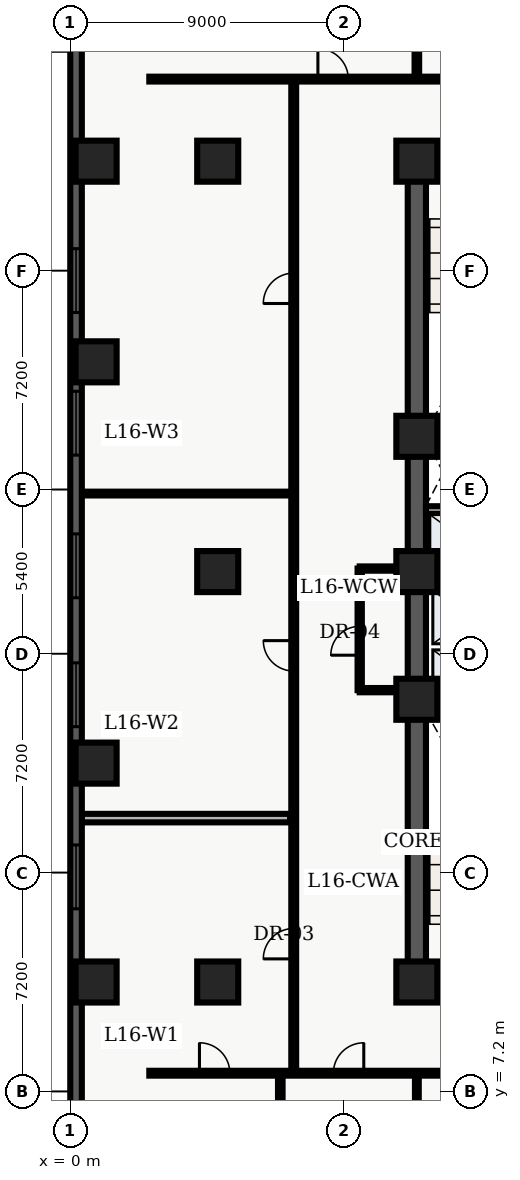
"""IFC4 building model, lengths in metres.
Left out: names, types, materials, properties, quantities, classifications, styles, units other than length and angle.
Written with IfcOpenShell. Run it as: python <this file> out.ifc"""

import sys

from ifc_helpers import new_model, entity, si_unit, converted_unit, direction, frame, origin_with_axes, origin_2d_with_axis, place, context, subcontext, project, spatial, polyline, rectangle, outline, extrude, element, fill, save


model = new_model("IFC4")
c1 = context("Model", 3, precision=1e-05, world=origin_with_axes(), true_north=direction((0.0, 1.0)))
c2 = subcontext(c1, "Body", "Model", "MODEL_VIEW")
j1 = project(units=[si_unit("LENGTHUNIT", "METRE"), converted_unit("PLANEANGLEUNIT", "DEGREE", entity("IfcPlaneAngleMeasure", 0.017), si_unit("PLANEANGLEUNIT", "RADIAN"), dimensions=[0, 0, 0, 0, 0, 0, 0])], contexts=[c1])
p1 = place(None, origin_with_axes())
s1 = spatial("IfcSite", under=j1, at=p1, CompositionType="ELEMENT")
p2 = place(p1, origin_with_axes())
s2 = spatial("IfcBuilding", under=s1, at=p2, CompositionType="ELEMENT")
p3 = place(p2, frame((0.0, 0.0, 67.8), z_axis=(0.0, 0.0, 1.0), x_axis=(1.0, 0.0, 0.0)))
s3 = spatial("IfcBuildingStorey", under=s2, at=p3, CompositionType="ELEMENT", Elevation=67.8)
p4 = place(p3, frame((11.4, 10.8, 0.0), z_axis=(0.0, 0.0, 1.0), x_axis=(0.0, 1.0, 0.0)))
e1 = element("IfcWall", 1, at=p4, inside=s3, PredefinedType="SHEAR", context=c2, shape_type="SweptSolid", body=[
    extrude(outline(polyline([(0.0, -0.3), (27.0, -0.3), (27.0, 0.3), (0.0, 0.3), (0.0, -0.3)])), origin_with_axes(), (0.0, 0.0, 1.0), 3.66),
])
p5 = place(p3, frame((11.4, 10.8, 0.0), z_axis=(0.0, 0.0, 1.0), x_axis=(1.0, 0.0, 0.0)))
e2 = element("IfcWall", 2, at=p5, inside=s3, PredefinedType="SHEAR", context=c2, shape_type="SweptSolid", body=[
    extrude(outline(polyline([(0.0, -0.3), (7.2, -0.3), (7.2, 0.3), (0.0, 0.3), (0.0, -0.3)])), origin_with_axes(), (0.0, 0.0, 1.0), 3.66),
])
p6 = place(p5, frame((2.625, 0.0, 0.0), z_axis=(0.0, 0.0, 1.0), x_axis=(1.0, 0.0, 0.0)))
e3 = element("IfcOpeningElement", 3, at=p6, cuts=e2, PredefinedType="OPENING", context=c2, shape_type="SweptSolid", body=[
    extrude(rectangle(XDim=1.05, YDim=0.62, at=origin_2d_with_axis()), origin_with_axes(), (0.0, 0.0, 1.0), 2.15),
])
p7 = place(p3, frame((11.4, 37.8, 0.0), z_axis=(0.0, 0.0, 1.0), x_axis=(1.0, 0.0, 0.0)))
e4 = element("IfcWall", 4, at=p7, inside=s3, PredefinedType="SHEAR", context=c2, shape_type="SweptSolid", body=[
    extrude(outline(polyline([(0.0, -0.3), (7.2, -0.3), (7.2, 0.3), (0.0, 0.3), (0.0, -0.3)])), origin_with_axes(), (0.0, 0.0, 1.0), 3.66),
])
p8 = place(p7, frame((2.625, 0.0, 0.0), z_axis=(0.0, 0.0, 1.0), x_axis=(1.0, 0.0, 0.0)))
e5 = element("IfcOpeningElement", 5, at=p8, cuts=e4, PredefinedType="OPENING", context=c2, shape_type="SweptSolid", body=[
    extrude(rectangle(XDim=1.05, YDim=0.62, at=origin_2d_with_axis()), origin_with_axes(), (0.0, 0.0, 1.0), 2.15),
])
for number, where, z_axis, x_axis in (
    (6, (11.7, 19.825, 0.0), (0.0, 0.0, 1.0), (1.0, 0.0, 0.0)),
    (7, (11.7, 28.775, 0.0), (0.0, 0.0, 1.0), (1.0, 0.0, 0.0)),
):
    element("IfcWall", number, at=place(p3, frame(where, z_axis=z_axis, x_axis=x_axis)), inside=s3, PredefinedType="SHEAR", context=c2, shape_type="SweptSolid", body=[
        extrude(outline(polyline([(0.0, -0.125), (6.6, -0.125), (6.6, 0.125), (0.0, 0.125), (0.0, -0.125)])), origin_with_axes(), (0.0, 0.0, 1.0), 3.66),
    ])
p9 = place(p3, frame((11.7, 24.1, 0.0), z_axis=(0.0, 0.0, 1.0), x_axis=(1.0, 0.0, 0.0)))
e8 = element("IfcWall", 8, at=p9, inside=s3, PredefinedType="SOLIDWALL", context=c2, shape_type="SweptSolid", body=[
    extrude(outline(polyline([(0.0, -0.125), (6.6, -0.125), (6.6, 0.125), (0.0, 0.125), (0.0, -0.125)])), origin_with_axes(), (0.0, 0.0, 1.0), 2.7),
])
p10 = place(p9, frame((3.75, 0.0, 0.0), z_axis=(0.0, 0.0, 1.0), x_axis=(1.0, 0.0, 0.0)))
e9 = element("IfcOpeningElement", 9, at=p10, cuts=e8, PredefinedType="OPENING", context=c2, shape_type="SweptSolid", body=[
    extrude(rectangle(XDim=0.9, YDim=0.27, at=origin_2d_with_axis()), origin_with_axes(), (0.0, 0.0, 1.0), 2.15),
])
p11 = place(p3, frame((11.7, 26.325, 0.0), z_axis=(0.0, 0.0, 1.0), x_axis=(1.0, 0.0, 0.0)))
e10 = element("IfcWall", 10, at=p11, inside=s3, PredefinedType="SOLIDWALL", context=c2, shape_type="SweptSolid", body=[
    extrude(outline(polyline([(0.0, -0.125), (6.6, -0.125), (6.6, 0.125), (0.0, 0.125), (0.0, -0.125)])), origin_with_axes(), (0.0, 0.0, 1.0), 2.7),
])
p12 = place(p11, frame((3.5, 0.0, 0.0), z_axis=(0.0, 0.0, 1.0), x_axis=(1.0, 0.0, 0.0)))
e11 = element("IfcOpeningElement", 11, at=p12, cuts=e10, PredefinedType="OPENING", context=c2, shape_type="SweptSolid", body=[
    extrude(rectangle(XDim=0.9, YDim=0.27, at=origin_2d_with_axis()), origin_with_axes(), (0.0, 0.0, 1.0), 2.15),
])
for number, where, z_axis, x_axis in (
    (12, (11.4, 10.8, 0.0), (0.0, 0.0, 1.0), (1.0, 0.0, 0.0)),
    (13, (11.4, 20.1, 0.0), (0.0, 0.0, 1.0), (1.0, 0.0, 0.0)),
    (14, (11.4, 24.3, 0.0), (0.0, 0.0, 1.0), (1.0, 0.0, 0.0)),
    (15, (11.4, 28.75, 0.0), (0.0, 0.0, 1.0), (1.0, 0.0, 0.0)),
    (16, (11.4, 37.8, 0.0), (0.0, 0.0, 1.0), (1.0, 0.0, 0.0)),
    (17, (4.85, 10.8, 0.0), (0.0, 0.0, 1.0), (1.0, 0.0, 0.0)),
    (18, (4.85, 24.3, 0.0), (0.0, 0.0, 1.0), (1.0, 0.0, 0.0)),
    (19, (4.85, 37.8, 0.0), (0.0, 0.0, 1.0), (1.0, 0.0, 0.0)),
    (20, (0.85, 10.8, 0.0), (0.0, 0.0, 1.0), (1.0, 0.0, 0.0)),
    (21, (0.85, 18.0, 0.0), (0.0, 0.0, 1.0), (1.0, 0.0, 0.0)),
    (22, (0.85, 31.2, 0.0), (0.0, 0.0, 1.0), (1.0, 0.0, 0.0)),
    (23, (0.85, 37.8, 0.0), (0.0, 0.0, 1.0), (1.0, 0.0, 0.0)),
):
    element("IfcColumn", number, at=place(p3, frame(where, z_axis=z_axis, x_axis=x_axis)), inside=s3, PredefinedType="COLUMN", context=c2, shape_type="SweptSolid", body=[
        extrude(rectangle(XDim=1.35, YDim=1.35, at=origin_2d_with_axis()), origin_with_axes(), (0.0, 0.0, 1.0), 3.9),
    ])
p13 = place(p3, frame((9.52, 20.4, 0.0), z_axis=(0.0, 0.0, 1.0), x_axis=(0.0, 1.0, 0.0)))
e24 = element("IfcWall", 24, at=p13, inside=s3, PredefinedType="PARTITIONING", context=c2, shape_type="SweptSolid", body=[
    extrude(outline(polyline([(0.0, -0.07), (4.0, -0.07), (4.0, 0.07), (0.0, 0.07), (0.0, -0.07)])), origin_with_axes(), (0.0, 0.0, 1.0), 2.7),
])
p14 = place(p13, frame((1.625, 0.0, 0.0), z_axis=(0.0, 0.0, 1.0), x_axis=(1.0, 0.0, 0.0)))
e25 = element("IfcOpeningElement", 25, at=p14, cuts=e24, PredefinedType="OPENING", context=c2, shape_type="SweptSolid", body=[
    extrude(rectangle(XDim=0.95, YDim=0.16, at=origin_2d_with_axis()), origin_with_axes(), (0.0, 0.0, 1.0), 2.15),
])
for number, where, z_axis, x_axis in (
    (26, (9.52, 20.4, 0.0), (0.0, 0.0, 1.0), (1.0, 0.0, 0.0)),
    (27, (9.52, 24.4, 0.0), (0.0, 0.0, 1.0), (1.0, 0.0, 0.0)),
):
    element("IfcWall", number, at=place(p3, frame(where, z_axis=z_axis, x_axis=x_axis)), inside=s3, PredefinedType="PARTITIONING", context=c2, shape_type="SweptSolid", body=[
        extrude(outline(polyline([(0.0, -0.07), (1.58, -0.07), (1.58, 0.07), (0.0, 0.07), (0.0, -0.07)])), origin_with_axes(), (0.0, 0.0, 1.0), 2.7),
    ])
p15 = place(p3, frame((2.6, 7.8, 0.0), z_axis=(0.0, 0.0, 1.0), x_axis=(1.0, 0.0, 0.0)))
e28 = element("IfcWall", 28, at=p15, inside=s3, PredefinedType="PARTITIONING", context=c2, shape_type="SweptSolid", body=[
    extrude(outline(polyline([(0.0, -0.08), (18.55, -0.08), (18.55, 0.08), (0.0, 0.08), (0.0, -0.08)])), origin_with_axes(), (0.0, 0.0, 1.0), 2.7),
])
p16 = place(p15, frame((2.149, 0.0, 0.0), z_axis=(0.0, 0.0, 1.0), x_axis=(1.0, 0.0, 0.0)))
e29 = element("IfcOpeningElement", 29, at=p16, cuts=e28, PredefinedType="OPENING", context=c2, shape_type="SweptSolid", body=[
    extrude(rectangle(XDim=1.0, YDim=0.18, at=origin_2d_with_axis()), origin_with_axes(), (0.0, 0.0, 1.0), 2.15),
])
p17 = place(p15, frame((6.554, 0.0, 0.0), z_axis=(0.0, 0.0, 1.0), x_axis=(1.0, 0.0, 0.0)))
e30 = element("IfcOpeningElement", 30, at=p17, cuts=e28, PredefinedType="OPENING", context=c2, shape_type="SweptSolid", body=[
    extrude(rectangle(XDim=1.0, YDim=0.18, at=origin_2d_with_axis()), origin_with_axes(), (0.0, 0.0, 1.0), 2.15),
])
p18 = place(p15, frame((11.937, 0.0, 0.0), z_axis=(0.0, 0.0, 1.0), x_axis=(1.0, 0.0, 0.0)))
e31 = element("IfcOpeningElement", 31, at=p18, cuts=e28, PredefinedType="OPENING", context=c2, shape_type="SweptSolid", body=[
    extrude(rectangle(XDim=1.0, YDim=0.18, at=origin_2d_with_axis()), origin_with_axes(), (0.0, 0.0, 1.0), 2.15),
])
p19 = place(p15, frame((16.507, 0.0, 0.0), z_axis=(0.0, 0.0, 1.0), x_axis=(1.0, 0.0, 0.0)))
e32 = element("IfcOpeningElement", 32, at=p19, cuts=e28, PredefinedType="OPENING", context=c2, shape_type="SweptSolid", body=[
    extrude(rectangle(XDim=1.0, YDim=0.18, at=origin_2d_with_axis()), origin_with_axes(), (0.0, 0.0, 1.0), 2.15),
])
p20 = place(p3, frame((2.6, 40.5, 0.0), z_axis=(0.0, 0.0, 1.0), x_axis=(1.0, 0.0, 0.0)))
e33 = element("IfcWall", 33, at=p20, inside=s3, PredefinedType="PARTITIONING", context=c2, shape_type="SweptSolid", body=[
    extrude(outline(polyline([(0.0, -0.08), (18.65, -0.08), (18.65, 0.08), (0.0, 0.08), (0.0, -0.08)])), origin_with_axes(), (0.0, 0.0, 1.0), 2.7),
])
p21 = place(p20, frame((6.045, 0.0, 0.0), z_axis=(0.0, 0.0, 1.0), x_axis=(1.0, 0.0, 0.0)))
e34 = element("IfcOpeningElement", 34, at=p21, cuts=e33, PredefinedType="OPENING", context=c2, shape_type="SweptSolid", body=[
    extrude(rectangle(XDim=1.0, YDim=0.18, at=origin_2d_with_axis()), origin_with_axes(), (0.0, 0.0, 1.0), 2.15),
])
p22 = place(p20, frame((12.61, 0.0, 0.0), z_axis=(0.0, 0.0, 1.0), x_axis=(1.0, 0.0, 0.0)))
e35 = element("IfcOpeningElement", 35, at=p22, cuts=e33, PredefinedType="OPENING", context=c2, shape_type="SweptSolid", body=[
    extrude(rectangle(XDim=1.2, YDim=0.18, at=origin_2d_with_axis()), origin_with_axes(), (0.0, 0.0, 1.0), 2.2),
])
p23 = place(p3, frame((7.35, 7.8, 0.0), z_axis=(0.0, 0.0, 1.0), x_axis=(0.0, 1.0, 0.0)))
e36 = element("IfcWall", 36, at=p23, inside=s3, PredefinedType="PARTITIONING", context=c2, shape_type="SweptSolid", body=[
    extrude(outline(polyline([(0.0, -0.08), (32.7, -0.08), (32.7, 0.08), (0.0, 0.08), (0.0, -0.08)])), origin_with_axes(), (0.0, 0.0, 1.0), 2.7),
])
p24 = place(p23, frame((4.261, 0.0, 0.0), z_axis=(0.0, 0.0, 1.0), x_axis=(1.0, 0.0, 0.0)))
e37 = element("IfcOpeningElement", 37, at=p24, cuts=e36, PredefinedType="OPENING", context=c2, shape_type="SweptSolid", body=[
    extrude(rectangle(XDim=1.0, YDim=0.18, at=origin_2d_with_axis()), origin_with_axes(), (0.0, 0.0, 1.0), 2.15),
])
p25 = place(p23, frame((13.729, 0.0, 0.0), z_axis=(0.0, 0.0, 1.0), x_axis=(1.0, 0.0, 0.0)))
e38 = element("IfcOpeningElement", 38, at=p25, cuts=e36, PredefinedType="OPENING", context=c2, shape_type="SweptSolid", body=[
    extrude(rectangle(XDim=1.0, YDim=0.18, at=origin_2d_with_axis()), origin_with_axes(), (0.0, 0.0, 1.0), 2.15),
])
p26 = place(p23, frame((25.819, 0.0, 0.0), z_axis=(0.0, 0.0, 1.0), x_axis=(1.0, 0.0, 0.0)))
e39 = element("IfcOpeningElement", 39, at=p26, cuts=e36, PredefinedType="OPENING", context=c2, shape_type="SweptSolid", body=[
    extrude(rectangle(XDim=1.0, YDim=0.18, at=origin_2d_with_axis()), origin_with_axes(), (0.0, 0.0, 1.0), 2.15),
])
p27 = place(p3, frame((0.375, 16.191, 0.0), z_axis=(0.0, 0.0, 1.0), x_axis=(1.0, 0.0, 0.0)))
e40 = element("IfcWall", 40, at=p27, inside=s3, PredefinedType="PARTITIONING", context=c2, shape_type="SweptSolid", body=[
    extrude(outline(polyline([(0.0, -0.14), (6.855, -0.14), (6.855, 0.14), (0.0, 0.14), (0.0, -0.14)])), origin_with_axes(), (0.0, 0.0, 1.0), 2.7),
])
p28 = place(p3, frame((0.375, 26.867, 0.0), z_axis=(0.0, 0.0, 1.0), x_axis=(1.0, 0.0, 0.0)))
e41 = element("IfcWall", 41, at=p28, inside=s3, PredefinedType="PARTITIONING", context=c2, shape_type="SweptSolid", body=[
    extrude(outline(polyline([(0.0, -0.062), (6.855, -0.062), (6.855, 0.062), (0.0, 0.062), (0.0, -0.062)])), origin_with_axes(), (0.0, 0.0, 1.0), 2.7),
])
p29 = place(p3, frame((6.908, 0.36, 0.0), z_axis=(0.0, 0.0, 1.0), x_axis=(0.0, 1.0, 0.0)))
e42 = element("IfcWall", 42, at=p29, inside=s3, PredefinedType="PARTITIONING", context=c2, shape_type="SweptSolid", body=[
    extrude(outline(polyline([(0.0, -0.075), (7.34, -0.075), (7.34, 0.075), (0.0, 0.075), (0.0, -0.075)])), origin_with_axes(), (0.0, 0.0, 1.0), 2.7),
])
p30 = place(p3, frame((11.4, 0.36, 0.0), z_axis=(0.0, 0.0, 1.0), x_axis=(0.0, 1.0, 0.0)))
e43 = element("IfcWall", 43, at=p30, inside=s3, PredefinedType="PARTITIONING", context=c2, shape_type="SweptSolid", body=[
    extrude(outline(polyline([(0.0, -0.062), (7.34, -0.062), (7.34, 0.062), (0.0, 0.062), (0.0, -0.062)])), origin_with_axes(), (0.0, 0.0, 1.0), 2.7),
])
p31 = place(p3, frame((11.4, 40.6, 0.0), z_axis=(0.0, 0.0, 1.0), x_axis=(0.0, 1.0, 0.0)))
e44 = element("IfcWall", 44, at=p31, inside=s3, PredefinedType="PARTITIONING", context=c2, shape_type="SweptSolid", body=[
    extrude(outline(polyline([(0.0, -0.075), (7.64, -0.075), (7.64, 0.075), (0.0, 0.075), (0.0, -0.075)])), origin_with_axes(), (0.0, 0.0, 1.0), 2.7),
])
p32 = place(p3, frame((0.19, 2.78, 0.0), z_axis=(0.0, 0.0, 1.0), x_axis=(0.0, 1.0, 0.0)))
e45 = element("IfcWall", 45, at=p32, inside=s3, PredefinedType="SOLIDWALL", context=c2, shape_type="SweptSolid", body=[
    extrude(outline(polyline([(0.0, -0.19), (43.42, -0.19), (43.42, 0.19), (0.0, 0.19), (0.0, -0.19)])), origin_with_axes(), (0.0, 0.0, 1.0), 3.66),
])
p33 = place(p32, frame((2.946, 0.0, 0.45), z_axis=(0.0, 0.0, 1.0), x_axis=(1.0, 0.0, 0.0)))
e46 = element("IfcOpeningElement", 46, at=p33, cuts=e45, PredefinedType="OPENING", context=c2, shape_type="SweptSolid", body=[
    extrude(rectangle(XDim=2.1, YDim=0.4, at=origin_2d_with_axis()), origin_with_axes(), (0.0, 0.0, 1.0), 2.2),
])
p34 = place(p32, frame((11.478, 0.0, 0.45), z_axis=(0.0, 0.0, 1.0), x_axis=(1.0, 0.0, 0.0)))
e47 = element("IfcOpeningElement", 47, at=p34, cuts=e45, PredefinedType="OPENING", context=c2, shape_type="SweptSolid", body=[
    extrude(rectangle(XDim=2.1, YDim=0.4, at=origin_2d_with_axis()), origin_with_axes(), (0.0, 0.0, 1.0), 2.2),
])
p35 = place(p32, frame((17.469, 0.0, 0.45), z_axis=(0.0, 0.0, 1.0), x_axis=(1.0, 0.0, 0.0)))
e48 = element("IfcOpeningElement", 48, at=p35, cuts=e45, PredefinedType="OPENING", context=c2, shape_type="SweptSolid", body=[
    extrude(rectangle(XDim=2.1, YDim=0.4, at=origin_2d_with_axis()), origin_with_axes(), (0.0, 0.0, 1.0), 2.2),
])
p36 = place(p32, frame((21.71, 0.0, 0.45), z_axis=(0.0, 0.0, 1.0), x_axis=(1.0, 0.0, 0.0)))
e49 = element("IfcOpeningElement", 49, at=p36, cuts=e45, PredefinedType="OPENING", context=c2, shape_type="SweptSolid", body=[
    extrude(rectangle(XDim=2.1, YDim=0.4, at=origin_2d_with_axis()), origin_with_axes(), (0.0, 0.0, 1.0), 2.2),
])
p37 = place(p32, frame((26.401, 0.0, 0.45), z_axis=(0.0, 0.0, 1.0), x_axis=(1.0, 0.0, 0.0)))
e50 = element("IfcOpeningElement", 50, at=p37, cuts=e45, PredefinedType="OPENING", context=c2, shape_type="SweptSolid", body=[
    extrude(rectangle(XDim=2.1, YDim=0.4, at=origin_2d_with_axis()), origin_with_axes(), (0.0, 0.0, 1.0), 2.2),
])
p38 = place(p32, frame((31.092, 0.0, 0.45), z_axis=(0.0, 0.0, 1.0), x_axis=(1.0, 0.0, 0.0)))
e51 = element("IfcOpeningElement", 51, at=p38, cuts=e45, PredefinedType="OPENING", context=c2, shape_type="SweptSolid", body=[
    extrude(rectangle(XDim=2.1, YDim=0.4, at=origin_2d_with_axis()), origin_with_axes(), (0.0, 0.0, 1.0), 2.2),
])
p39 = place(p32, frame((40.024, 0.0, 0.45), z_axis=(0.0, 0.0, 1.0), x_axis=(1.0, 0.0, 0.0)))
e52 = element("IfcOpeningElement", 52, at=p39, cuts=e45, PredefinedType="OPENING", context=c2, shape_type="SweptSolid", body=[
    extrude(rectangle(XDim=2.1, YDim=0.4, at=origin_2d_with_axis()), origin_with_axes(), (0.0, 0.0, 1.0), 2.2),
])
p40 = place(p13, frame((1.625, 0.0, 0.0), z_axis=(0.0, 0.0, 1.0), x_axis=(1.0, 0.0, 0.0)))
e53 = element("IfcDoor", 53, at=p40, inside=s3, OperationType="SINGLE_SWING_LEFT", PredefinedType="DOOR", context=c2, shape_type="SweptSolid", body=[
    extrude(rectangle(XDim=0.95, YDim=0.084, at=origin_2d_with_axis()), origin_with_axes(), (0.0, 0.0, 1.0), 2.15),
])
fill(e25, e53)
p41 = place(p23, frame((4.261, 0.0, 0.0), z_axis=(0.0, 0.0, 1.0), x_axis=(1.0, 0.0, 0.0)))
e54 = element("IfcDoor", 54, at=p41, inside=s3, OperationType="SINGLE_SWING_LEFT", PredefinedType="DOOR", context=c2, shape_type="SweptSolid", body=[
    extrude(rectangle(XDim=1.0, YDim=0.09, at=origin_2d_with_axis()), origin_with_axes(), (0.0, 0.0, 1.0), 2.15),
])
fill(e37, e54)
p42 = place(p23, frame((13.729, 0.0, 0.0), z_axis=(0.0, 0.0, 1.0), x_axis=(1.0, 0.0, 0.0)))
e55 = element("IfcDoor", 55, at=p42, inside=s3, OperationType="SINGLE_SWING_RIGHT", PredefinedType="DOOR", context=c2, shape_type="SweptSolid", body=[
    extrude(rectangle(XDim=1.0, YDim=0.09, at=origin_2d_with_axis()), origin_with_axes(), (0.0, 0.0, 1.0), 2.15),
])
fill(e38, e55)
p43 = place(p23, frame((25.819, 0.0, 0.0), z_axis=(0.0, 0.0, 1.0), x_axis=(1.0, 0.0, 0.0)))
e56 = element("IfcDoor", 56, at=p43, inside=s3, OperationType="SINGLE_SWING_LEFT", PredefinedType="DOOR", context=c2, shape_type="SweptSolid", body=[
    extrude(rectangle(XDim=1.0, YDim=0.09, at=origin_2d_with_axis()), origin_with_axes(), (0.0, 0.0, 1.0), 2.15),
])
fill(e39, e56)
p44 = place(p15, frame((2.149, 0.0, 0.0), z_axis=(0.0, 0.0, 1.0), x_axis=(1.0, 0.0, 0.0)))
e57 = element("IfcDoor", 57, at=p44, inside=s3, OperationType="SINGLE_SWING_LEFT", PredefinedType="DOOR", context=c2, shape_type="SweptSolid", body=[
    extrude(rectangle(XDim=1.0, YDim=0.09, at=origin_2d_with_axis()), origin_with_axes(), (0.0, 0.0, 1.0), 2.15),
])
fill(e29, e57)
p45 = place(p15, frame((6.554, 0.0, 0.0), z_axis=(0.0, 0.0, 1.0), x_axis=(1.0, 0.0, 0.0)))
e58 = element("IfcDoor", 58, at=p45, inside=s3, OperationType="SINGLE_SWING_RIGHT", PredefinedType="DOOR", context=c2, shape_type="SweptSolid", body=[
    extrude(rectangle(XDim=1.0, YDim=0.09, at=origin_2d_with_axis()), origin_with_axes(), (0.0, 0.0, 1.0), 2.15),
])
fill(e30, e58)
p46 = place(p20, frame((6.045, 0.0, 0.0), z_axis=(0.0, 0.0, 1.0), x_axis=(1.0, 0.0, 0.0)))
e59 = element("IfcDoor", 59, at=p46, inside=s3, OperationType="SINGLE_SWING_LEFT", PredefinedType="DOOR", context=c2, shape_type="SweptSolid", body=[
    extrude(rectangle(XDim=1.0, YDim=0.09, at=origin_2d_with_axis()), origin_with_axes(), (0.0, 0.0, 1.0), 2.15),
])
fill(e34, e59)
p47 = place(p32, frame((11.478, 0.0, 0.45), z_axis=(0.0, 0.0, 1.0), x_axis=(1.0, 0.0, 0.0)))
e60 = element("IfcWindow", 60, at=p47, inside=s3, PredefinedType="WINDOW", context=c2, shape_type="SweptSolid", body=[
    extrude(rectangle(XDim=2.1, YDim=0.09, at=origin_2d_with_axis()), origin_with_axes(), (0.0, 0.0, 1.0), 2.2),
])
fill(e47, e60)
p48 = place(p32, frame((17.469, 0.0, 0.45), z_axis=(0.0, 0.0, 1.0), x_axis=(1.0, 0.0, 0.0)))
e61 = element("IfcWindow", 61, at=p48, inside=s3, PredefinedType="WINDOW", context=c2, shape_type="SweptSolid", body=[
    extrude(rectangle(XDim=2.1, YDim=0.09, at=origin_2d_with_axis()), origin_with_axes(), (0.0, 0.0, 1.0), 2.2),
])
fill(e48, e61)
p49 = place(p32, frame((21.71, 0.0, 0.45), z_axis=(0.0, 0.0, 1.0), x_axis=(1.0, 0.0, 0.0)))
e62 = element("IfcWindow", 62, at=p49, inside=s3, PredefinedType="WINDOW", context=c2, shape_type="SweptSolid", body=[
    extrude(rectangle(XDim=2.1, YDim=0.09, at=origin_2d_with_axis()), origin_with_axes(), (0.0, 0.0, 1.0), 2.2),
])
fill(e49, e62)
p50 = place(p32, frame((26.401, 0.0, 0.45), z_axis=(0.0, 0.0, 1.0), x_axis=(1.0, 0.0, 0.0)))
e63 = element("IfcWindow", 63, at=p50, inside=s3, PredefinedType="WINDOW", context=c2, shape_type="SweptSolid", body=[
    extrude(rectangle(XDim=2.1, YDim=0.09, at=origin_2d_with_axis()), origin_with_axes(), (0.0, 0.0, 1.0), 2.2),
])
fill(e50, e63)
p51 = place(p32, frame((31.092, 0.0, 0.45), z_axis=(0.0, 0.0, 1.0), x_axis=(1.0, 0.0, 0.0)))
e64 = element("IfcWindow", 64, at=p51, inside=s3, PredefinedType="WINDOW", context=c2, shape_type="SweptSolid", body=[
    extrude(rectangle(XDim=2.1, YDim=0.09, at=origin_2d_with_axis()), origin_with_axes(), (0.0, 0.0, 1.0), 2.2),
])
fill(e51, e64)
save(model, sys.argv[1])
